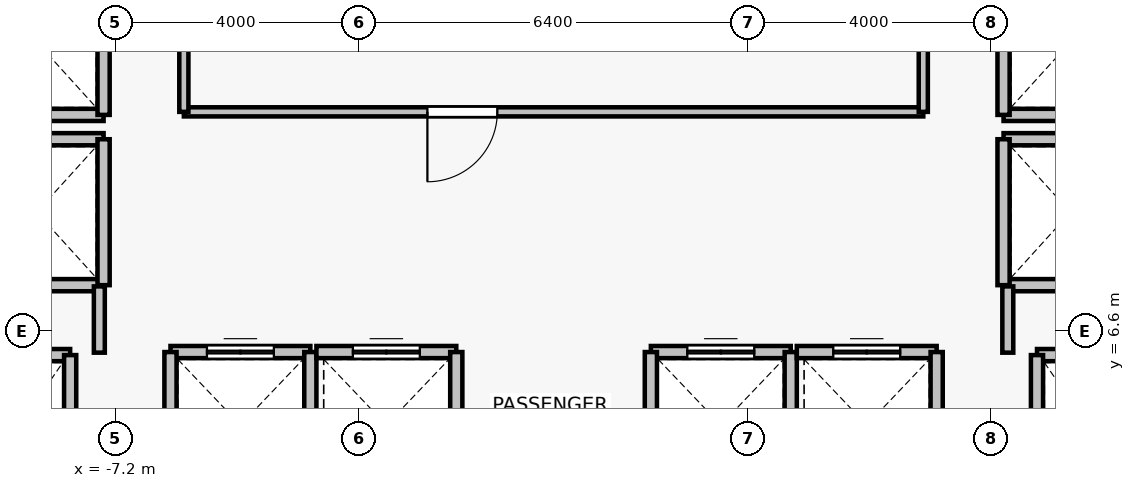
"""IFC4 building model, lengths in metres.
Left out: names, types, materials, properties, quantities, classifications, styles, units other than length and angle.
Written with IfcOpenShell. Run it as: python <this file> out.ifc"""

import sys

from ifc_helpers import new_model, si_unit, direction, frame, frame_2d, origin, place, context, subcontext, project, spatial, rectangle, extrude, source, transform, mapped, element, fill, save


model = new_model("IFC4")
c1 = context("Model", 3, precision=1e-05, world=origin(), true_north=direction((0.0, 1.0)))
c2 = subcontext(c1, "Body", "Model", "MODEL_VIEW")
j1 = project(units=[si_unit("LENGTHUNIT", "METRE"), si_unit("PLANEANGLEUNIT", "RADIAN")], contexts=[c1])
p1 = place(None, origin())
s1 = spatial("IfcSite", under=j1, at=p1, CompositionType="ELEMENT")
p2 = place(p1, origin())
s2 = spatial("IfcBuilding", under=s1, at=p2, CompositionType="ELEMENT")
p3 = place(p2, frame((0.0, 0.0, 166.0)))
s3 = spatial("IfcBuildingStorey", under=s2, at=p3, CompositionType="ELEMENT", Elevation=166.0)
p4 = place(p3, frame((-9.95, 6.2, 0.0), z_axis=(0.0, 0.0, 1.0), x_axis=(1.0, 0.0, 0.0)))
e1 = element("IfcWall", 1, at=p4, inside=s3, PredefinedType="SOLIDWALL", context=c2, shape_type="SweptSolid", body=[
    extrude(rectangle(XDim=2.0, YDim=0.2, at=frame_2d((1.0, 0.0))), origin(), (0.0, 0.0, 1.0), 3.075),
])
p5 = place(p3, frame((-7.95, 6.2, 0.0), z_axis=(0.0, 0.0, 1.0), x_axis=(0.0, -1.0, 0.0)))
e2 = element("IfcWall", 2, at=p5, inside=s3, PredefinedType="SOLIDWALL", context=c2, shape_type="SweptSolid", body=[
    extrude(rectangle(XDim=2.8, YDim=0.2, at=frame_2d((1.4, 0.0))), origin(), (0.0, 0.0, 1.0), 3.075),
])
p6 = place(p3, frame((7.95, 6.2, 0.0), z_axis=(0.0, 0.0, 1.0), x_axis=(1.0, 0.0, 0.0)))
e3 = element("IfcWall", 3, at=p6, inside=s3, PredefinedType="SOLIDWALL", context=c2, shape_type="SweptSolid", body=[
    extrude(rectangle(XDim=2.0, YDim=0.2, at=frame_2d((1.0, 0.0))), origin(), (0.0, 0.0, 1.0), 3.075),
])
p7 = place(p3, frame((7.95, 3.4, 0.0), z_axis=(0.0, 0.0, 1.0), x_axis=(0.0, 1.0, 0.0)))
e4 = element("IfcWall", 4, at=p7, inside=s3, PredefinedType="SOLIDWALL", context=c2, shape_type="SweptSolid", body=[
    extrude(rectangle(XDim=2.8, YDim=0.2, at=frame_2d((1.4, 0.0))), origin(), (0.0, 0.0, 1.0), 3.075),
])
p8 = place(p3, frame((-6.3, 6.25, 0.0), z_axis=(0.0, 0.0, 1.0), x_axis=(1.0, 0.0, 0.0)))
e5 = element("IfcWall", 5, at=p8, inside=s3, PredefinedType="SOLIDWALL", context=c2, shape_type="SweptSolid", body=[
    extrude(rectangle(XDim=2.3, YDim=0.2, at=frame_2d((1.15, 0.0))), origin(), (0.0, 0.0, 1.0), 3.075),
])
p9 = place(p8, frame((0.6, 0.0, 0.0)))
e6 = element("IfcOpeningElement", 6, at=p9, cuts=e5, PredefinedType="OPENING", context=c2, shape_type="SweptSolid", body=[
    extrude(rectangle(XDim=1.1, YDim=2.2, at=frame_2d((0.55, 1.1))), frame((0.0, 0.11, 0.0), z_axis=(0.0, -1.0, 0.0), x_axis=(1.0, 0.0, 0.0)), (0.0, 0.0, 1.0), 0.22),
])
for number, where, z_axis, x_axis in (
    (7, (-6.3, 3.85, 0.0), (0.0, 0.0, 1.0), (0.0, 1.0, 0.0)),
    (8, (-4.0, 6.25, 0.0), (0.0, 0.0, 1.0), (0.0, -1.0, 0.0)),
):
    element("IfcWall", number, at=place(p3, frame(where, z_axis=z_axis, x_axis=x_axis)), inside=s3, PredefinedType="SOLIDWALL", context=c2, shape_type="SweptSolid", body=[
        extrude(rectangle(XDim=2.4, YDim=0.2, at=frame_2d((1.2, 0.0))), origin(), (0.0, 0.0, 1.0), 3.075),
    ])
p10 = place(p3, frame((-3.9, 6.25, 0.0), z_axis=(0.0, 0.0, 1.0), x_axis=(1.0, 0.0, 0.0)))
e9 = element("IfcWall", 9, at=p10, inside=s3, PredefinedType="SOLIDWALL", context=c2, shape_type="SweptSolid", body=[
    extrude(rectangle(XDim=2.3, YDim=0.2, at=frame_2d((1.15, 0.0))), origin(), (0.0, 0.0, 1.0), 3.075),
])
p11 = place(p10, frame((0.6, 0.0, 0.0)))
e10 = element("IfcOpeningElement", 10, at=p11, cuts=e9, PredefinedType="OPENING", context=c2, shape_type="SweptSolid", body=[
    extrude(rectangle(XDim=1.1, YDim=2.2, at=frame_2d((0.55, 1.1))), frame((0.0, 0.11, 0.0), z_axis=(0.0, -1.0, 0.0), x_axis=(1.0, 0.0, 0.0)), (0.0, 0.0, 1.0), 0.22),
])
p12 = place(p3, frame((-1.6, 6.25, 0.0), z_axis=(0.0, 0.0, 1.0), x_axis=(0.0, -1.0, 0.0)))
e11 = element("IfcWall", 11, at=p12, inside=s3, PredefinedType="SOLIDWALL", context=c2, shape_type="SweptSolid", body=[
    extrude(rectangle(XDim=2.4, YDim=0.2, at=frame_2d((1.2, 0.0))), origin(), (0.0, 0.0, 1.0), 3.075),
])
p13 = place(p3, frame((1.6, 6.25, 0.0), z_axis=(0.0, 0.0, 1.0), x_axis=(1.0, 0.0, 0.0)))
e12 = element("IfcWall", 12, at=p13, inside=s3, PredefinedType="SOLIDWALL", context=c2, shape_type="SweptSolid", body=[
    extrude(rectangle(XDim=2.3, YDim=0.2, at=frame_2d((1.15, 0.0))), origin(), (0.0, 0.0, 1.0), 3.075),
])
p14 = place(p13, frame((0.6, 0.0, 0.0)))
e13 = element("IfcOpeningElement", 13, at=p14, cuts=e12, PredefinedType="OPENING", context=c2, shape_type="SweptSolid", body=[
    extrude(rectangle(XDim=1.1, YDim=2.2, at=frame_2d((0.55, 1.1))), frame((0.0, 0.11, 0.0), z_axis=(0.0, -1.0, 0.0), x_axis=(1.0, 0.0, 0.0)), (0.0, 0.0, 1.0), 0.22),
])
for number, where, z_axis, x_axis in (
    (14, (1.6, 3.85, 0.0), (0.0, 0.0, 1.0), (0.0, 1.0, 0.0)),
    (15, (3.9, 6.25, 0.0), (0.0, 0.0, 1.0), (0.0, -1.0, 0.0)),
):
    element("IfcWall", number, at=place(p3, frame(where, z_axis=z_axis, x_axis=x_axis)), inside=s3, PredefinedType="SOLIDWALL", context=c2, shape_type="SweptSolid", body=[
        extrude(rectangle(XDim=2.4, YDim=0.2, at=frame_2d((1.2, 0.0))), origin(), (0.0, 0.0, 1.0), 3.075),
    ])
p15 = place(p3, frame((4.0, 6.25, 0.0), z_axis=(0.0, 0.0, 1.0), x_axis=(1.0, 0.0, 0.0)))
e16 = element("IfcWall", 16, at=p15, inside=s3, PredefinedType="SOLIDWALL", context=c2, shape_type="SweptSolid", body=[
    extrude(rectangle(XDim=2.3, YDim=0.2, at=frame_2d((1.15, 0.0))), origin(), (0.0, 0.0, 1.0), 3.075),
])
p16 = place(p15, frame((0.6, 0.0, 0.0)))
e17 = element("IfcOpeningElement", 17, at=p16, cuts=e16, PredefinedType="OPENING", context=c2, shape_type="SweptSolid", body=[
    extrude(rectangle(XDim=1.1, YDim=2.2, at=frame_2d((0.55, 1.1))), frame((0.0, 0.11, 0.0), z_axis=(0.0, -1.0, 0.0), x_axis=(1.0, 0.0, 0.0)), (0.0, 0.0, 1.0), 0.22),
])
p17 = place(p3, frame((6.3, 6.25, 0.0), z_axis=(0.0, 0.0, 1.0), x_axis=(0.0, -1.0, 0.0)))
e18 = element("IfcWall", 18, at=p17, inside=s3, PredefinedType="SOLIDWALL", context=c2, shape_type="SweptSolid", body=[
    extrude(rectangle(XDim=2.4, YDim=0.2, at=frame_2d((1.2, 0.0))), origin(), (0.0, 0.0, 1.0), 3.075),
])
for number, where, z_axis, x_axis in (
    (19, (-7.4, 7.35, 0.0), (0.0, 0.0, 1.0), (-1.0, 0.0, 0.0)),
    (20, (-9.6, 9.75, 0.0), (0.0, 0.0, 1.0), (1.0, 0.0, 0.0)),
):
    element("IfcWall", number, at=place(p3, frame(where, z_axis=z_axis, x_axis=x_axis)), inside=s3, PredefinedType="SOLIDWALL", context=c2, shape_type="SweptSolid", body=[
        extrude(rectangle(XDim=2.2, YDim=0.2, at=frame_2d((1.1, 0.0))), origin(), (0.0, 0.0, 1.0), 2.565),
    ])
p18 = place(p3, frame((-7.4, 9.75, 0.0), z_axis=(0.0, 0.0, 1.0), x_axis=(0.0, -1.0, 0.0)))
e21 = element("IfcWall", 21, at=p18, inside=s3, PredefinedType="SOLIDWALL", context=c2, shape_type="SweptSolid", body=[
    extrude(rectangle(XDim=2.4, YDim=0.2, at=frame_2d((1.2, 0.0))), origin(), (0.0, 0.0, 1.0), 2.565),
])
p19 = place(p3, frame((-7.4, 10.15, 0.0), z_axis=(0.0, 0.0, 1.0), x_axis=(-1.0, 0.0, 0.0)))
e22 = element("IfcWall", 22, at=p19, inside=s3, PredefinedType="SOLIDWALL", context=c2, shape_type="SweptSolid", body=[
    extrude(rectangle(XDim=2.2, YDim=0.2, at=frame_2d((1.1, 0.0))), origin(), (0.0, 0.0, 1.0), 2.565),
])
p20 = place(p3, frame((-7.4, 12.55, 0.0), z_axis=(0.0, 0.0, 1.0), x_axis=(0.0, -1.0, 0.0)))
e23 = element("IfcWall", 23, at=p20, inside=s3, PredefinedType="SOLIDWALL", context=c2, shape_type="SweptSolid", body=[
    extrude(rectangle(XDim=2.4, YDim=0.2, at=frame_2d((1.2, 0.0))), origin(), (0.0, 0.0, 1.0), 2.565),
])
for number, where, z_axis, x_axis in (
    (24, (9.6, 7.35, 0.0), (0.0, 0.0, 1.0), (-1.0, 0.0, 0.0)),
    (25, (7.4, 9.75, 0.0), (0.0, 0.0, 1.0), (1.0, 0.0, 0.0)),
):
    element("IfcWall", number, at=place(p3, frame(where, z_axis=z_axis, x_axis=x_axis)), inside=s3, PredefinedType="SOLIDWALL", context=c2, shape_type="SweptSolid", body=[
        extrude(rectangle(XDim=2.2, YDim=0.2, at=frame_2d((1.1, 0.0))), origin(), (0.0, 0.0, 1.0), 2.565),
    ])
p21 = place(p3, frame((7.4, 7.35, 0.0), z_axis=(0.0, 0.0, 1.0), x_axis=(0.0, 1.0, 0.0)))
e26 = element("IfcWall", 26, at=p21, inside=s3, PredefinedType="SOLIDWALL", context=c2, shape_type="SweptSolid", body=[
    extrude(rectangle(XDim=2.4, YDim=0.2, at=frame_2d((1.2, 0.0))), origin(), (0.0, 0.0, 1.0), 2.565),
])
p22 = place(p3, frame((9.6, 10.15, 0.0), z_axis=(0.0, 0.0, 1.0), x_axis=(-1.0, 0.0, 0.0)))
e27 = element("IfcWall", 27, at=p22, inside=s3, PredefinedType="SOLIDWALL", context=c2, shape_type="SweptSolid", body=[
    extrude(rectangle(XDim=2.2, YDim=0.2, at=frame_2d((1.1, 0.0))), origin(), (0.0, 0.0, 1.0), 2.565),
])
p23 = place(p3, frame((7.4, 10.15, 0.0), z_axis=(0.0, 0.0, 1.0), x_axis=(0.0, 1.0, 0.0)))
e28 = element("IfcWall", 28, at=p23, inside=s3, PredefinedType="SOLIDWALL", context=c2, shape_type="SweptSolid", body=[
    extrude(rectangle(XDim=2.4, YDim=0.2, at=frame_2d((1.2, 0.0))), origin(), (0.0, 0.0, 1.0), 2.565),
])
for number, where, z_axis, x_axis in (
    (29, (-7.47, 7.33, 0.0), (0.0, 0.0, 1.0), (0.0, -1.0, 0.0)),
    (30, (7.47, 6.24, 0.0), (0.0, 0.0, 1.0), (0.0, 1.0, 0.0)),
):
    element("IfcWall", number, at=place(p3, frame(where, z_axis=z_axis, x_axis=x_axis)), inside=s3, PredefinedType="PARTITIONING", context=c2, shape_type="SweptSolid", body=[
        extrude(rectangle(XDim=1.09, YDim=0.18, at=frame_2d((0.545, 0.0))), origin(), (0.0, 0.0, 1.0), 2.565),
    ])
p24 = place(p3, frame((6.08, 10.2, 0.0), z_axis=(0.0, 0.0, 1.0), x_axis=(-1.0, 0.0, 0.0)))
e31 = element("IfcWall", 31, at=p24, inside=s3, PredefinedType="PARTITIONING", context=c2, shape_type="SweptSolid", body=[
    extrude(rectangle(XDim=12.16, YDim=0.15, at=frame_2d((6.08, 0.0))), origin(), (0.0, 0.0, 1.0), 3.075),
])
p25 = place(p24, frame((7.005, 0.0, 0.0)))
e32 = element("IfcOpeningElement", 32, at=p25, cuts=e31, PredefinedType="OPENING", context=c2, shape_type="SweptSolid", body=[
    extrude(rectangle(XDim=1.15, YDim=2.15, at=frame_2d((0.575, 1.075))), frame((0.0, 0.085, 0.0), z_axis=(0.0, -1.0, 0.0), x_axis=(1.0, 0.0, 0.0)), (0.0, 0.0, 1.0), 0.17),
])
for number, where, z_axis, x_axis in (
    (33, (-6.08, 10.2, 0.0), (0.0, 0.0, 1.0), (0.0, 1.0, 0.0)),
    (34, (6.08, 13.0, 0.0), (0.0, 0.0, 1.0), (0.0, -1.0, 0.0)),
):
    element("IfcWall", number, at=place(p3, frame(where, z_axis=z_axis, x_axis=x_axis)), inside=s3, PredefinedType="PARTITIONING", context=c2, shape_type="SweptSolid", body=[
        extrude(rectangle(XDim=2.8, YDim=0.15, at=frame_2d((1.4, 0.0))), origin(), (0.0, 0.0, 1.0), 3.075),
    ])
m1 = source(origin(), c2, "Body", "SweptSolid", [
    extrude(rectangle(XDim=1.1, YDim=2.2, at=frame_2d((0.55, 1.1))), frame((0.0, 0.025, 0.0), z_axis=(0.0, -1.0, 0.0), x_axis=(1.0, 0.0, 0.0)), (0.0, 0.0, 1.0), 0.05),
])
p26 = place(p9, origin())
e35 = element("IfcDoor", 35, at=p26, inside=s3, OperationType="DOUBLE_DOOR_SLIDING", PredefinedType="DOOR", context=c2, shape_type="MappedRepresentation", body=[
    mapped(m1, transform((0.0, 0.0, 0.0), x_axis=(1.0, 0.0, 0.0), y_axis=(0.0, 1.0, 0.0), z_axis=(0.0, 0.0, 1.0), scale=1.0)),
])
fill(e6, e35)
p27 = place(p11, origin())
e36 = element("IfcDoor", 36, at=p27, inside=s3, OperationType="DOUBLE_DOOR_SLIDING", PredefinedType="DOOR", context=c2, shape_type="MappedRepresentation", body=[
    mapped(m1, transform((0.0, 0.0, 0.0), x_axis=(1.0, 0.0, 0.0), y_axis=(0.0, 1.0, 0.0), z_axis=(0.0, 0.0, 1.0), scale=1.0)),
])
fill(e10, e36)
p28 = place(p14, origin())
e37 = element("IfcDoor", 37, at=p28, inside=s3, OperationType="DOUBLE_DOOR_SLIDING", PredefinedType="DOOR", context=c2, shape_type="MappedRepresentation", body=[
    mapped(m1, transform((0.0, 0.0, 0.0), x_axis=(1.0, 0.0, 0.0), y_axis=(0.0, 1.0, 0.0), z_axis=(0.0, 0.0, 1.0), scale=1.0)),
])
fill(e13, e37)
p29 = place(p16, origin())
e38 = element("IfcDoor", 38, at=p29, inside=s3, OperationType="DOUBLE_DOOR_SLIDING", PredefinedType="DOOR", context=c2, shape_type="MappedRepresentation", body=[
    mapped(m1, transform((0.0, 0.0, 0.0), x_axis=(1.0, 0.0, 0.0), y_axis=(0.0, 1.0, 0.0), z_axis=(0.0, 0.0, 1.0), scale=1.0)),
])
fill(e17, e38)
m2 = source(origin(), c2, "Body", "SweptSolid", [
    extrude(rectangle(XDim=1.15, YDim=2.15, at=frame_2d((0.575, 1.075))), frame((0.0, 0.025, 0.0), z_axis=(0.0, -1.0, 0.0), x_axis=(1.0, 0.0, 0.0)), (0.0, 0.0, 1.0), 0.05),
])
p30 = place(p25, origin())
e39 = element("IfcDoor", 39, at=p30, inside=s3, OperationType="SINGLE_SWING_RIGHT", PredefinedType="DOOR", context=c2, shape_type="MappedRepresentation", body=[
    mapped(m2, transform((0.0, 0.0, 0.0), x_axis=(1.0, 0.0, 0.0), y_axis=(0.0, 1.0, 0.0), z_axis=(0.0, 0.0, 1.0), scale=1.0)),
])
fill(e32, e39)
save(model, sys.argv[1])
